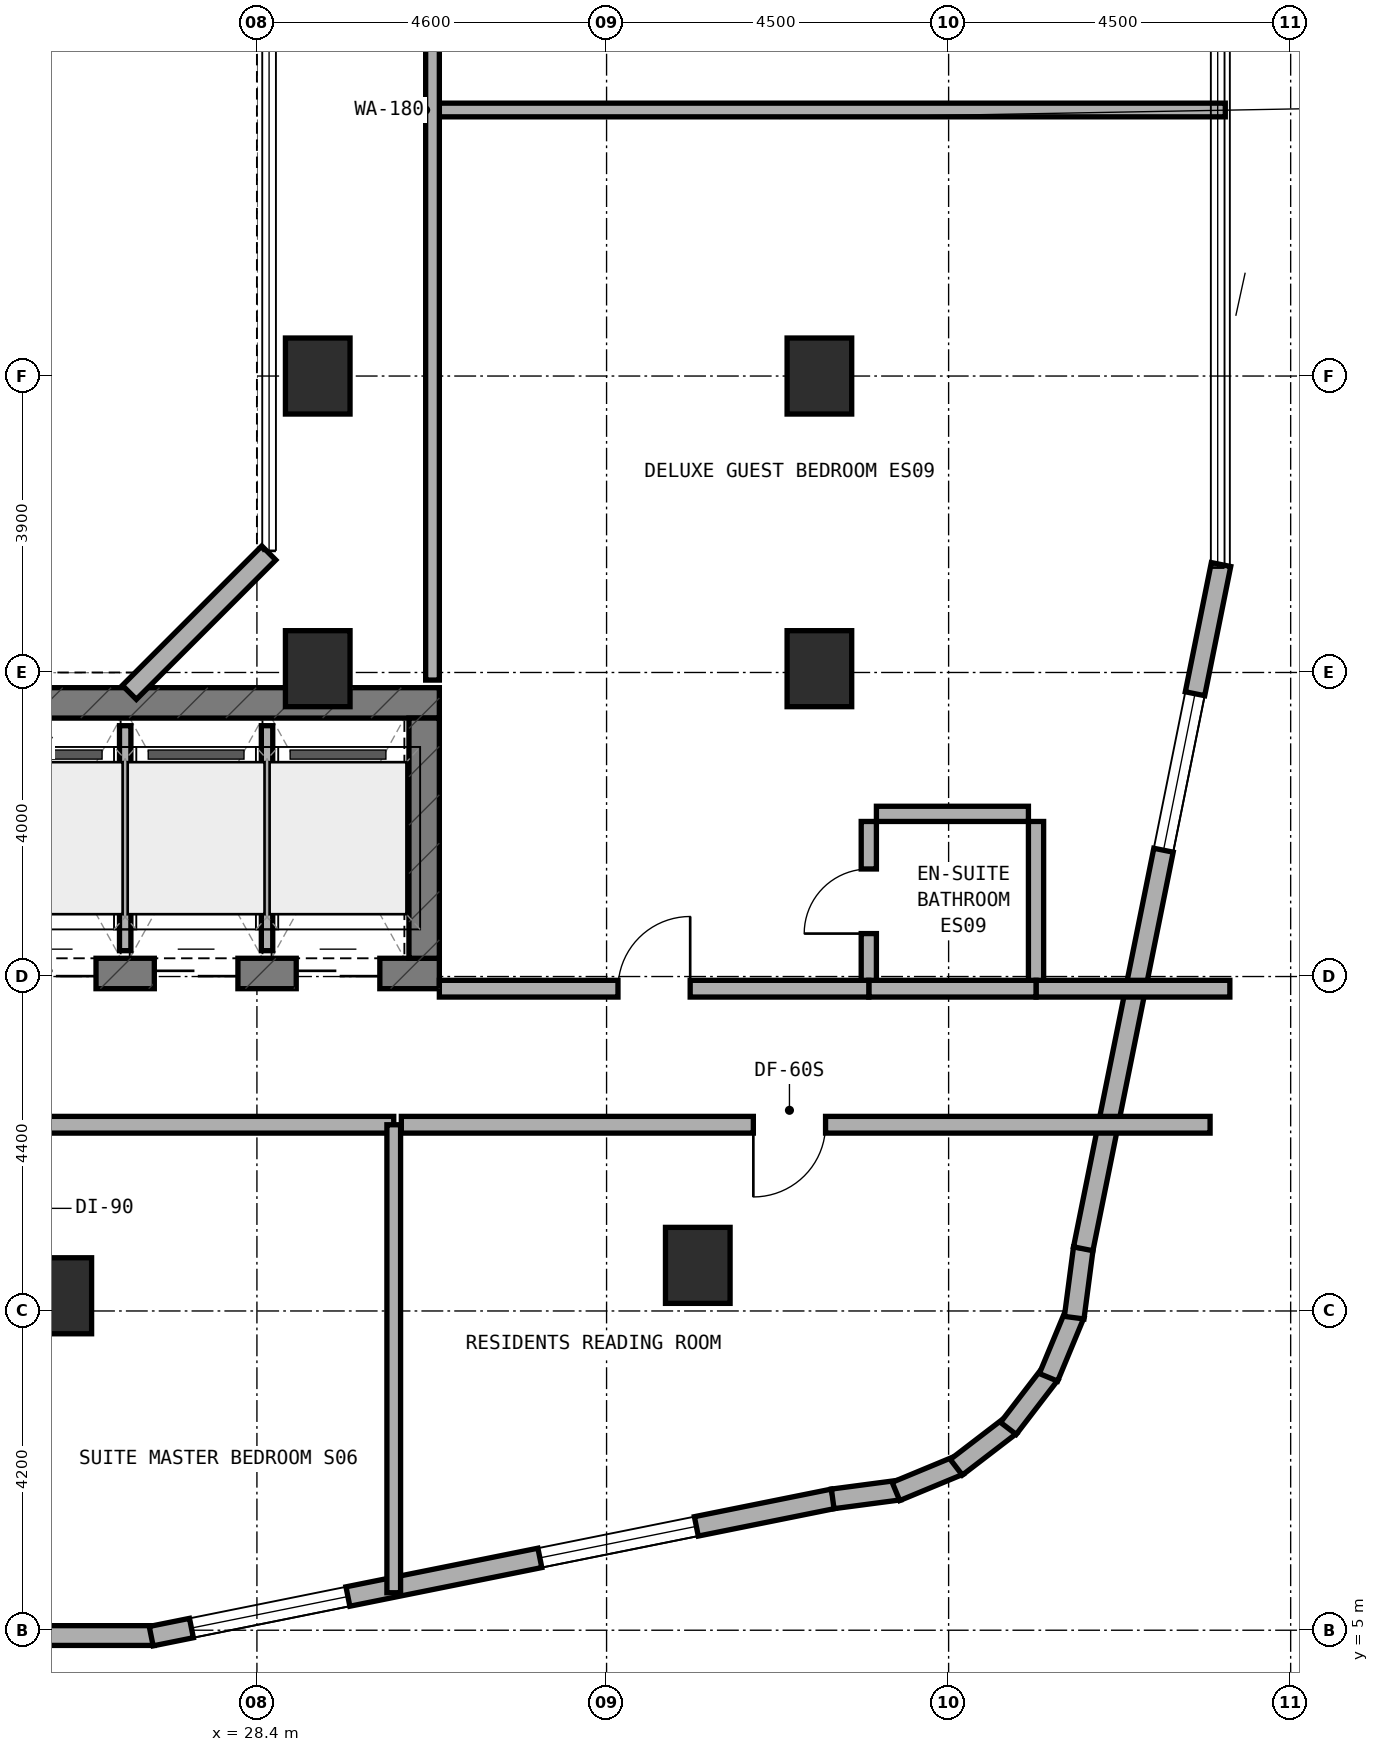
"""IFC4 building model, lengths in metres.
Left out: names, types, materials, properties, quantities, classifications, styles, units other than length and angle.
Written with IfcOpenShell. Run it as: python <this file> out.ifc"""

import sys

from ifc_helpers import new_model, si_unit, direction, frame, frame_2d, origin, origin_2d, place, context, subcontext, project, spatial, rectangle, extrude, element, fill, save


model = new_model("IFC4")
c1 = context("Model", 3, precision=1e-05, world=origin(), true_north=direction((0.0, 1.0)))
c2 = subcontext(c1, "Body", "Model", "MODEL_VIEW")
j1 = project(units=[si_unit("LENGTHUNIT", "METRE"), si_unit("PLANEANGLEUNIT", "RADIAN")], contexts=[c1])
p1 = place(None, origin())
s1 = spatial("IfcSite", under=j1, at=p1, CompositionType="ELEMENT")
p2 = place(p1, origin())
s2 = spatial("IfcBuilding", under=s1, at=p2, CompositionType="ELEMENT")
p3 = place(p2, frame((0.0, 0.0, 134.5)))
s3 = spatial("IfcBuildingStorey", under=s2, at=p3, CompositionType="ELEMENT", Elevation=134.5)
p4 = place(p3, frame((6.4, 13.64, 0.0), z_axis=(0.0, 0.0, 1.0), x_axis=(1.0, 0.0, 0.0)))
e1 = element("IfcWall", 1, at=p4, inside=s3, PredefinedType="SHEAR", context=c2, shape_type="SweptSolid", body=[
    extrude(rectangle(XDim=24.4, YDim=0.4, at=frame_2d((12.2, 0.0))), origin(), (0.0, 0.0, 1.0), 3.5),
])
p5 = place(p4, frame((9.15, 0.0, 0.0)))
e2 = element("IfcOpeningElement", 2, at=p5, cuts=e1, PredefinedType="OPENING", context=c2, shape_type="SweptSolid", body=[
    extrude(rectangle(XDim=1.2, YDim=2.15, at=frame_2d((0.6, 1.075))), frame((0.0, 0.21, 0.0), z_axis=(0.0, -1.0, 0.0), x_axis=(1.0, 0.0, 0.0)), (0.0, 0.0, 1.0), 0.42),
])
p6 = place(p4, frame((16.94, 0.0, 0.0)))
e3 = element("IfcOpeningElement", 3, at=p6, cuts=e1, PredefinedType="OPENING", context=c2, shape_type="SweptSolid", body=[
    extrude(rectangle(XDim=0.85, YDim=2.1, at=frame_2d((0.425, 1.05))), frame((0.0, 0.21, 0.0), z_axis=(0.0, -1.0, 0.0), x_axis=(1.0, 0.0, 0.0)), (0.0, 0.0, 1.0), 0.42),
])
p7 = place(p4, frame((18.783, 0.0, 0.0)))
e4 = element("IfcOpeningElement", 4, at=p7, cuts=e1, PredefinedType="OPENING", context=c2, shape_type="SweptSolid", body=[
    extrude(rectangle(XDim=1.1, YDim=2.15, at=frame_2d((0.55, 1.075))), frame((0.0, 0.21, 0.0), z_axis=(0.0, -1.0, 0.0), x_axis=(1.0, 0.0, 0.0)), (0.0, 0.0, 1.0), 0.42),
])
p8 = place(p4, frame((20.65, 0.0, 0.0)))
e5 = element("IfcOpeningElement", 5, at=p8, cuts=e1, PredefinedType="OPENING", context=c2, shape_type="SweptSolid", body=[
    extrude(rectangle(XDim=1.1, YDim=2.15, at=frame_2d((0.55, 1.075))), frame((0.0, 0.21, 0.0), z_axis=(0.0, -1.0, 0.0), x_axis=(1.0, 0.0, 0.0)), (0.0, 0.0, 1.0), 0.42),
])
p9 = place(p4, frame((22.517, 0.0, 0.0)))
e6 = element("IfcOpeningElement", 6, at=p9, cuts=e1, PredefinedType="OPENING", context=c2, shape_type="SweptSolid", body=[
    extrude(rectangle(XDim=1.1, YDim=2.15, at=frame_2d((0.55, 1.075))), frame((0.0, 0.21, 0.0), z_axis=(0.0, -1.0, 0.0), x_axis=(1.0, 0.0, 0.0)), (0.0, 0.0, 1.0), 0.42),
])
p10 = place(p3, frame((6.4, 17.2, 0.0), z_axis=(0.0, 0.0, 1.0), x_axis=(1.0, 0.0, 0.0)))
e7 = element("IfcWall", 7, at=p10, inside=s3, PredefinedType="SHEAR", context=c2, shape_type="SweptSolid", body=[
    extrude(rectangle(XDim=24.4, YDim=0.4, at=frame_2d((12.2, 0.0))), origin(), (0.0, 0.0, 1.0), 3.5),
])
p11 = place(p3, frame((30.6, 13.84, 0.0), z_axis=(0.0, 0.0, 1.0), x_axis=(0.0, 1.0, 0.0)))
e8 = element("IfcWall", 8, at=p11, inside=s3, PredefinedType="SHEAR", context=c2, shape_type="SweptSolid", body=[
    extrude(rectangle(XDim=3.16, YDim=0.4, at=frame_2d((1.58, 0.0))), origin(), (0.0, 0.0, 1.0), 3.5),
])
for number, where, z_axis, x_axis in (
    (9, (25.8, 9.4, 0.0), (0.0, 0.0, 1.0), (1.0, 0.0, 0.0)),
    (10, (34.2, 9.8, 0.0), (0.0, 0.0, 1.0), (1.0, 0.0, 0.0)),
    (11, (35.8, 21.5, 0.0), (0.0, 0.0, 1.0), (1.0, 0.0, 0.0)),
    (12, (35.8, 17.65, 0.0), (0.0, 0.0, 1.0), (1.0, 0.0, 0.0)),
    (13, (29.2, 17.65, 0.0), (0.0, 0.0, 1.0), (1.0, 0.0, 0.0)),
    (14, (29.2, 21.5, 0.0), (0.0, 0.0, 1.0), (1.0, 0.0, 0.0)),
):
    element("IfcColumn", number, at=place(p3, frame(where, z_axis=z_axis, x_axis=x_axis)), inside=s3, PredefinedType="COLUMN", context=c2, shape_type="SweptSolid", body=[
        extrude(rectangle(XDim=0.85, YDim=1.0, at=origin_2d()), origin(), (0.0, 0.0, 1.0), 3.5),
    ])
p12 = place(p3, frame((14.915, 4.93, 0.0), z_axis=(0.0, 0.0, 1.0), x_axis=(1.0, 0.0, 0.0)))
e15 = element("IfcWall", 15, at=p12, inside=s3, PredefinedType="STANDARD", context=c2, shape_type="SweptSolid", body=[
    extrude(rectangle(XDim=12.135, YDim=0.26, at=frame_2d((6.067, 0.0))), origin(), (0.0, 0.0, 1.0), 3.22),
])
p13 = place(p12, frame((5.485, 0.0, 0.0)))
e16 = element("IfcOpeningElement", 16, at=p13, cuts=e15, PredefinedType="OPENING", context=c2, shape_type="SweptSolid", body=[
    extrude(rectangle(XDim=1.2, YDim=2.15, at=frame_2d((0.6, 1.075))), frame((0.0, 0.14, 0.0), z_axis=(0.0, -1.0, 0.0), x_axis=(1.0, 0.0, 0.0)), (0.0, 0.0, 1.0), 0.28),
])
p14 = place(p12, frame((2.26, 0.0, 0.85)))
e17 = element("IfcOpeningElement", 17, at=p14, cuts=e15, PredefinedType="OPENING", context=c2, shape_type="SweptSolid", body=[
    extrude(rectangle(XDim=2.1, YDim=1.5, at=frame_2d((1.05, 0.75))), frame((0.0, 0.14, 0.0), z_axis=(0.0, -1.0, 0.0), x_axis=(1.0, 0.0, 0.0)), (0.0, 0.0, 1.0), 0.28),
])
p15 = place(p12, frame((7.61, 0.0, 0.85)))
e18 = element("IfcOpeningElement", 18, at=p15, cuts=e15, PredefinedType="OPENING", context=c2, shape_type="SweptSolid", body=[
    extrude(rectangle(XDim=2.1, YDim=1.5, at=frame_2d((1.05, 0.75))), frame((0.0, 0.14, 0.0), z_axis=(0.0, -1.0, 0.0), x_axis=(1.0, 0.0, 0.0)), (0.0, 0.0, 1.0), 0.28),
])
p16 = place(p3, frame((27.009, 4.922, 0.0), z_axis=(0.0, 0.0, 1.0), x_axis=(0.980321298532, 0.197408590603, 0.0)))
e19 = element("IfcWall", 19, at=p16, inside=s3, PredefinedType="STANDARD", context=c2, shape_type="SweptSolid", body=[
    extrude(rectangle(XDim=9.153, YDim=0.26, at=frame_2d((4.577, 0.0))), origin(), (0.0, 0.0, 1.0), 3.22),
])
p17 = place(p16, frame((0.54, 0.0, 0.85)))
e20 = element("IfcOpeningElement", 20, at=p17, cuts=e19, PredefinedType="OPENING", context=c2, shape_type="SweptSolid", body=[
    extrude(rectangle(XDim=2.1, YDim=1.5, at=frame_2d((1.05, 0.75))), frame((0.0, 0.14, 0.0), z_axis=(0.0, -1.0, 0.0), x_axis=(1.0, 0.0, 0.0)), (0.0, 0.0, 1.0), 0.28),
])
p18 = place(p16, frame((5.216, 0.0, 0.85)))
e21 = element("IfcOpeningElement", 21, at=p18, cuts=e19, PredefinedType="OPENING", context=c2, shape_type="SweptSolid", body=[
    extrude(rectangle(XDim=2.1, YDim=1.5, at=frame_2d((1.05, 0.75))), frame((0.0, 0.14, 0.0), z_axis=(0.0, -1.0, 0.0), x_axis=(1.0, 0.0, 0.0)), (0.0, 0.0, 1.0), 0.28),
])
p19 = place(p3, frame((35.975, 6.728, 0.0), z_axis=(0.0, 0.0, 1.0), x_axis=(0.991388484223, 0.130953706898, 0.0)))
e22 = element("IfcWall", 22, at=p19, inside=s3, PredefinedType="STANDARD", context=c2, shape_type="SweptSolid", body=[
    extrude(rectangle(XDim=0.885, YDim=0.26, at=frame_2d((0.443, 0.0))), origin(), (0.0, 0.0, 1.0), 3.22),
])
p20 = place(p3, frame((36.807, 6.826, 0.0), z_axis=(0.0, 0.0, 1.0), x_axis=(0.923627776508, 0.383290660547, 0.0)))
e23 = element("IfcWall", 23, at=p20, inside=s3, PredefinedType="STANDARD", context=c2, shape_type="SweptSolid", body=[
    extrude(rectangle(XDim=0.903, YDim=0.26, at=frame_2d((0.452, 0.0))), origin(), (0.0, 0.0, 1.0), 3.22),
])
p21 = place(p3, frame((37.601, 7.144, 0.0), z_axis=(0.0, 0.0, 1.0), x_axis=(0.793458244748, 0.608624690463, 0.0)))
e24 = element("IfcWall", 24, at=p21, inside=s3, PredefinedType="STANDARD", context=c2, shape_type="SweptSolid", body=[
    extrude(rectangle(XDim=0.902, YDim=0.26, at=frame_2d((0.451, 0.0))), origin(), (0.0, 0.0, 1.0), 3.22),
])
p22 = place(p3, frame((38.286, 7.655, 0.0), z_axis=(0.0, 0.0, 1.0), x_axis=(0.608494022858, 0.793558456666, 0.0)))
e25 = element("IfcWall", 25, at=p22, inside=s3, PredefinedType="STANDARD", context=c2, shape_type="SweptSolid", body=[
    extrude(rectangle(XDim=0.902, YDim=0.26, at=frame_2d((0.451, 0.0))), origin(), (0.0, 0.0, 1.0), 3.22),
])
p23 = place(p3, frame((38.814, 8.327, 0.0), z_axis=(0.0, 0.0, 1.0), x_axis=(0.383155708213, 0.923683767999, 0.0)))
e26 = element("IfcWall", 26, at=p23, inside=s3, PredefinedType="STANDARD", context=c2, shape_type="SweptSolid", body=[
    extrude(rectangle(XDim=0.903, YDim=0.26, at=frame_2d((0.451, 0.0))), origin(), (0.0, 0.0, 1.0), 3.22),
])
p24 = place(p3, frame((39.152, 9.112, 0.0), z_axis=(0.0, 0.0, 1.0), x_axis=(0.130200706103, 0.991487658083, 0.0)))
e27 = element("IfcWall", 27, at=p24, inside=s3, PredefinedType="STANDARD", context=c2, shape_type="SweptSolid", body=[
    extrude(rectangle(XDim=0.921, YDim=0.26, at=frame_2d((0.46, 0.0))), origin(), (0.0, 0.0, 1.0), 3.22),
])
p25 = place(p3, frame((39.271, 10.018, 0.0), z_axis=(0.0, 0.0, 1.0), x_axis=(0.197435082048, 0.980315963543, 0.0)))
e28 = element("IfcWall", 28, at=p25, inside=s3, PredefinedType="STANDARD", context=c2, shape_type="SweptSolid", body=[
    extrude(rectangle(XDim=9.183, YDim=0.26, at=frame_2d((4.591, 0.0))), origin(), (0.0, 0.0, 1.0), 3.22),
])
p26 = place(p25, frame((5.349, 0.0, 0.85)))
e29 = element("IfcOpeningElement", 29, at=p26, cuts=e28, PredefinedType="OPENING", context=c2, shape_type="SweptSolid", body=[
    extrude(rectangle(XDim=2.1, YDim=1.5, at=frame_2d((1.05, 0.75))), frame((0.0, 0.14, 0.0), z_axis=(0.0, -1.0, 0.0), x_axis=(1.0, 0.0, 0.0)), (0.0, 0.0, 1.0), 0.28),
])
p27 = place(p3, frame((26.722, 17.338, 0.0), z_axis=(0.0, 0.0, 1.0), x_axis=(0.707059717605, 0.707153841636, 0.0)))
e30 = element("IfcWall", 30, at=p27, inside=s3, PredefinedType="STANDARD", context=c2, shape_type="SweptSolid", body=[
    extrude(rectangle(XDim=2.594, YDim=0.26, at=frame_2d((1.297, 0.0))), origin(), (0.0, 0.0, 1.0), 3.22),
])
p28 = place(p3, frame((26.667, 13.94, 0.0), z_axis=(0.0, 0.0, 1.0), x_axis=(0.0, 1.0, 0.0)))
e31 = element("IfcWall", 31, at=p28, inside=s3, PredefinedType="PARTITIONING", context=c2, shape_type="SweptSolid", body=[
    extrude(rectangle(XDim=2.96, YDim=0.15, at=frame_2d((1.48, 0.0))), origin(), (0.0, 0.0, 1.0), 3.22),
])
p29 = place(p3, frame((28.533, 13.94, 0.0), z_axis=(0.0, 0.0, 1.0), x_axis=(0.0, 1.0, 0.0)))
e32 = element("IfcWall", 32, at=p29, inside=s3, PredefinedType="PARTITIONING", context=c2, shape_type="SweptSolid", body=[
    extrude(rectangle(XDim=2.96, YDim=0.15, at=frame_2d((1.48, 0.0))), origin(), (0.0, 0.0, 1.0), 2.695),
])
p30 = place(p3, frame((18.4, 11.65, 0.0), z_axis=(0.0, 0.0, 1.0), x_axis=(1.0, 0.0, 0.0)))
e33 = element("IfcWall", 33, at=p30, inside=s3, PredefinedType="SOLIDWALL", context=c2, shape_type="SweptSolid", body=[
    extrude(rectangle(XDim=11.8, YDim=0.22, at=frame_2d((5.9, 0.0))), origin(), (0.0, 0.0, 1.0), 2.695),
])
p31 = place(p30, frame((5.425, 0.0, 0.0)))
e34 = element("IfcOpeningElement", 34, at=p31, cuts=e33, PredefinedType="OPENING", context=c2, shape_type="SweptSolid", body=[
    extrude(rectangle(XDim=0.95, YDim=2.1, at=frame_2d((0.475, 1.05))), frame((0.0, 0.12, 0.0), z_axis=(0.0, -1.0, 0.0), x_axis=(1.0, 0.0, 0.0)), (0.0, 0.0, 1.0), 0.24),
])
p32 = place(p3, frame((30.2, 5.493, 0.0), z_axis=(0.0, 0.0, 1.0), x_axis=(0.0, 1.0, 0.0)))
e35 = element("IfcWall", 35, at=p32, inside=s3, PredefinedType="SOLIDWALL", context=c2, shape_type="SweptSolid", body=[
    extrude(rectangle(XDim=6.157, YDim=0.18, at=frame_2d((3.079, 0.0))), origin(), (0.0, 0.0, 1.0), 2.835),
])
p33 = place(p3, frame((30.3, 11.65, 0.0), z_axis=(0.0, 0.0, 1.0), x_axis=(1.0, 0.0, 0.0)))
e36 = element("IfcWall", 36, at=p33, inside=s3, PredefinedType="SOLIDWALL", context=c2, shape_type="SweptSolid", body=[
    extrude(rectangle(XDim=10.64, YDim=0.22, at=frame_2d((5.32, 0.0))), origin(), (0.0, 0.0, 1.0), 2.695),
])
p34 = place(p33, frame((4.631, 0.0, 0.0)))
e37 = element("IfcOpeningElement", 37, at=p34, cuts=e36, PredefinedType="OPENING", context=c2, shape_type="SweptSolid", body=[
    extrude(rectangle(XDim=0.95, YDim=2.1, at=frame_2d((0.475, 1.05))), frame((0.0, 0.12, 0.0), z_axis=(0.0, -1.0, 0.0), x_axis=(1.0, 0.0, 0.0)), (0.0, 0.0, 1.0), 0.24),
])
p35 = place(p3, frame((30.8, 25.0, 0.0), z_axis=(0.0, 0.0, 1.0), x_axis=(1.0, 0.0, 0.0)))
e38 = element("IfcWall", 38, at=p35, inside=s3, PredefinedType="SOLIDWALL", context=c2, shape_type="SweptSolid", body=[
    extrude(rectangle(XDim=10.34, YDim=0.18, at=frame_2d((5.17, 0.0))), origin(), (0.0, 0.0, 1.0), 2.835),
])
p36 = place(p3, frame((30.71, 17.5, 0.0), z_axis=(0.0, 0.0, 1.0), x_axis=(0.0, 1.0, 0.0)))
e39 = element("IfcWall", 39, at=p36, inside=s3, PredefinedType="SOLIDWALL", context=c2, shape_type="SweptSolid", body=[
    extrude(rectangle(XDim=15.0, YDim=0.18, at=frame_2d((7.5, 0.0))), origin(), (0.0, 0.0, 1.0), 2.695),
])
p37 = place(p3, frame((36.45, 13.54, 0.0), z_axis=(0.0, 0.0, 1.0), x_axis=(0.0, 1.0, 0.0)))
e40 = element("IfcWall", 40, at=p37, inside=s3, PredefinedType="PLUMBINGWALL", context=c2, shape_type="SweptSolid", body=[
    extrude(rectangle(XDim=2.1, YDim=0.2, at=frame_2d((1.05, 0.0))), origin(), (0.0, 0.0, 1.0), 3.22),
])
p38 = place(p37, frame((0.625, 0.0, 0.0)))
e41 = element("IfcOpeningElement", 41, at=p38, cuts=e40, PredefinedType="OPENING", context=c2, shape_type="SweptSolid", body=[
    extrude(rectangle(XDim=0.85, YDim=2.1, at=frame_2d((0.425, 1.05))), frame((0.0, 0.11, 0.0), z_axis=(0.0, -1.0, 0.0), x_axis=(1.0, 0.0, 0.0)), (0.0, 0.0, 1.0), 0.22),
])
p39 = place(p3, frame((36.55, 15.74, 0.0), z_axis=(0.0, 0.0, 1.0), x_axis=(1.0, 0.0, 0.0)))
e42 = element("IfcWall", 42, at=p39, inside=s3, PredefinedType="PLUMBINGWALL", context=c2, shape_type="SweptSolid", body=[
    extrude(rectangle(XDim=2.0, YDim=0.2, at=frame_2d((1.0, 0.0))), origin(), (0.0, 0.0, 1.0), 3.22),
])
p40 = place(p3, frame((38.65, 13.54, 0.0), z_axis=(0.0, 0.0, 1.0), x_axis=(0.0, 1.0, 0.0)))
e43 = element("IfcWall", 43, at=p40, inside=s3, PredefinedType="PLUMBINGWALL", context=c2, shape_type="SweptSolid", body=[
    extrude(rectangle(XDim=2.1, YDim=0.2, at=frame_2d((1.05, 0.0))), origin(), (0.0, 0.0, 1.0), 3.22),
])
p41 = place(p3, frame((38.65, 13.44, 0.0), z_axis=(0.0, 0.0, 1.0), x_axis=(1.0, 0.0, 0.0)))
e44 = element("IfcWall", 44, at=p41, inside=s3, PredefinedType="SOLIDWALL", context=c2, shape_type="SweptSolid", body=[
    extrude(rectangle(XDim=2.55, YDim=0.22, at=frame_2d((1.275, 0.0))), origin(), (0.0, 0.0, 1.0), 3.22),
])
p42 = place(p3, frame((36.45, 13.44, 0.0), z_axis=(0.0, 0.0, 1.0), x_axis=(1.0, 0.0, 0.0)))
e45 = element("IfcWall", 45, at=p42, inside=s3, PredefinedType="SOLIDWALL", context=c2, shape_type="SweptSolid", body=[
    extrude(rectangle(XDim=2.2, YDim=0.22, at=frame_2d((1.1, 0.0))), origin(), (0.0, 0.0, 1.0), 3.22),
])
p43 = place(p3, frame((30.8, 13.44, 0.0), z_axis=(0.0, 0.0, 1.0), x_axis=(1.0, 0.0, 0.0)))
e46 = element("IfcWall", 46, at=p43, inside=s3, PredefinedType="SOLIDWALL", context=c2, shape_type="SweptSolid", body=[
    extrude(rectangle(XDim=5.65, YDim=0.22, at=frame_2d((2.825, 0.0))), origin(), (0.0, 0.0, 1.0), 2.695),
])
p44 = place(p43, frame((2.35, 0.0, 0.0)))
e47 = element("IfcOpeningElement", 47, at=p44, cuts=e46, PredefinedType="OPENING", context=c2, shape_type="SweptSolid", body=[
    extrude(rectangle(XDim=0.95, YDim=2.1, at=frame_2d((0.475, 1.05))), frame((0.0, 0.12, 0.0), z_axis=(0.0, -1.0, 0.0), x_axis=(1.0, 0.0, 0.0)), (0.0, 0.0, 1.0), 0.24),
])
p45 = place(p17, origin())
e48 = element("IfcWindow", 48, at=p45, inside=s3, PartitioningType="SINGLE_PANEL", PredefinedType="WINDOW", context=c2, shape_type="SweptSolid", body=[
    extrude(rectangle(XDim=2.1, YDim=1.5, at=frame_2d((1.05, 0.75))), frame((0.0, 0.03, 0.0), z_axis=(0.0, -1.0, 0.0), x_axis=(1.0, 0.0, 0.0)), (0.0, 0.0, 1.0), 0.06),
])
fill(e20, e48)
p46 = place(p18, origin())
e49 = element("IfcWindow", 49, at=p46, inside=s3, PartitioningType="SINGLE_PANEL", PredefinedType="WINDOW", context=c2, shape_type="SweptSolid", body=[
    extrude(rectangle(XDim=2.1, YDim=1.5, at=frame_2d((1.05, 0.75))), frame((0.0, 0.03, 0.0), z_axis=(0.0, -1.0, 0.0), x_axis=(1.0, 0.0, 0.0)), (0.0, 0.0, 1.0), 0.06),
])
fill(e21, e49)
p47 = place(p26, origin())
e50 = element("IfcWindow", 50, at=p47, inside=s3, PartitioningType="SINGLE_PANEL", PredefinedType="WINDOW", context=c2, shape_type="SweptSolid", body=[
    extrude(rectangle(XDim=2.1, YDim=1.5, at=frame_2d((1.05, 0.75))), frame((0.0, 0.03, 0.0), z_axis=(0.0, -1.0, 0.0), x_axis=(1.0, 0.0, 0.0)), (0.0, 0.0, 1.0), 0.06),
])
fill(e29, e50)
p48 = place(p7, frame((1.1, 0.0, 0.0), z_axis=(0.0, 0.0, 1.0), x_axis=(-1.0, 0.0, 0.0)))
e51 = element("IfcDoor", 51, at=p48, inside=s3, OperationType="DOUBLE_DOOR_SLIDING", PredefinedType="DOOR", context=c2, shape_type="SweptSolid", body=[
    extrude(rectangle(XDim=1.1, YDim=2.15, at=frame_2d((0.55, 1.075))), frame((0.0, 0.025, 0.0), z_axis=(0.0, -1.0, 0.0), x_axis=(1.0, 0.0, 0.0)), (0.0, 0.0, 1.0), 0.05),
])
fill(e4, e51)
p49 = place(p8, frame((1.1, 0.0, 0.0), z_axis=(0.0, 0.0, 1.0), x_axis=(-1.0, 0.0, 0.0)))
e52 = element("IfcDoor", 52, at=p49, inside=s3, OperationType="DOUBLE_DOOR_SLIDING", PredefinedType="DOOR", context=c2, shape_type="SweptSolid", body=[
    extrude(rectangle(XDim=1.1, YDim=2.15, at=frame_2d((0.55, 1.075))), frame((0.0, 0.025, 0.0), z_axis=(0.0, -1.0, 0.0), x_axis=(1.0, 0.0, 0.0)), (0.0, 0.0, 1.0), 0.05),
])
fill(e5, e52)
p50 = place(p9, frame((1.1, 0.0, 0.0), z_axis=(0.0, 0.0, 1.0), x_axis=(-1.0, 0.0, 0.0)))
e53 = element("IfcDoor", 53, at=p50, inside=s3, OperationType="DOUBLE_DOOR_SLIDING", PredefinedType="DOOR", context=c2, shape_type="SweptSolid", body=[
    extrude(rectangle(XDim=1.1, YDim=2.15, at=frame_2d((0.55, 1.075))), frame((0.0, 0.025, 0.0), z_axis=(0.0, -1.0, 0.0), x_axis=(1.0, 0.0, 0.0)), (0.0, 0.0, 1.0), 0.05),
])
fill(e6, e53)
p51 = place(p34, frame((0.95, 0.0, 0.0), z_axis=(0.0, 0.0, 1.0), x_axis=(-1.0, 0.0, 0.0)))
e54 = element("IfcDoor", 54, at=p51, inside=s3, OperationType="SINGLE_SWING_RIGHT", PredefinedType="DOOR", context=c2, shape_type="SweptSolid", body=[
    extrude(rectangle(XDim=0.95, YDim=2.1, at=frame_2d((0.475, 1.05))), frame((0.0, 0.025, 0.0), z_axis=(0.0, -1.0, 0.0), x_axis=(1.0, 0.0, 0.0)), (0.0, 0.0, 1.0), 0.05),
])
fill(e37, e54)
p52 = place(p38, origin())
e55 = element("IfcDoor", 55, at=p52, inside=s3, OperationType="SINGLE_SWING_LEFT", PredefinedType="DOOR", context=c2, shape_type="SweptSolid", body=[
    extrude(rectangle(XDim=0.85, YDim=2.1, at=frame_2d((0.425, 1.05))), frame((0.0, 0.025, 0.0), z_axis=(0.0, -1.0, 0.0), x_axis=(1.0, 0.0, 0.0)), (0.0, 0.0, 1.0), 0.05),
])
fill(e41, e55)
p53 = place(p44, origin())
e56 = element("IfcDoor", 56, at=p53, inside=s3, OperationType="SINGLE_SWING_RIGHT", PredefinedType="DOOR", context=c2, shape_type="SweptSolid", body=[
    extrude(rectangle(XDim=0.95, YDim=2.1, at=frame_2d((0.475, 1.05))), frame((0.0, 0.025, 0.0), z_axis=(0.0, -1.0, 0.0), x_axis=(1.0, 0.0, 0.0)), (0.0, 0.0, 1.0), 0.05),
])
fill(e47, e56)
save(model, sys.argv[1])
